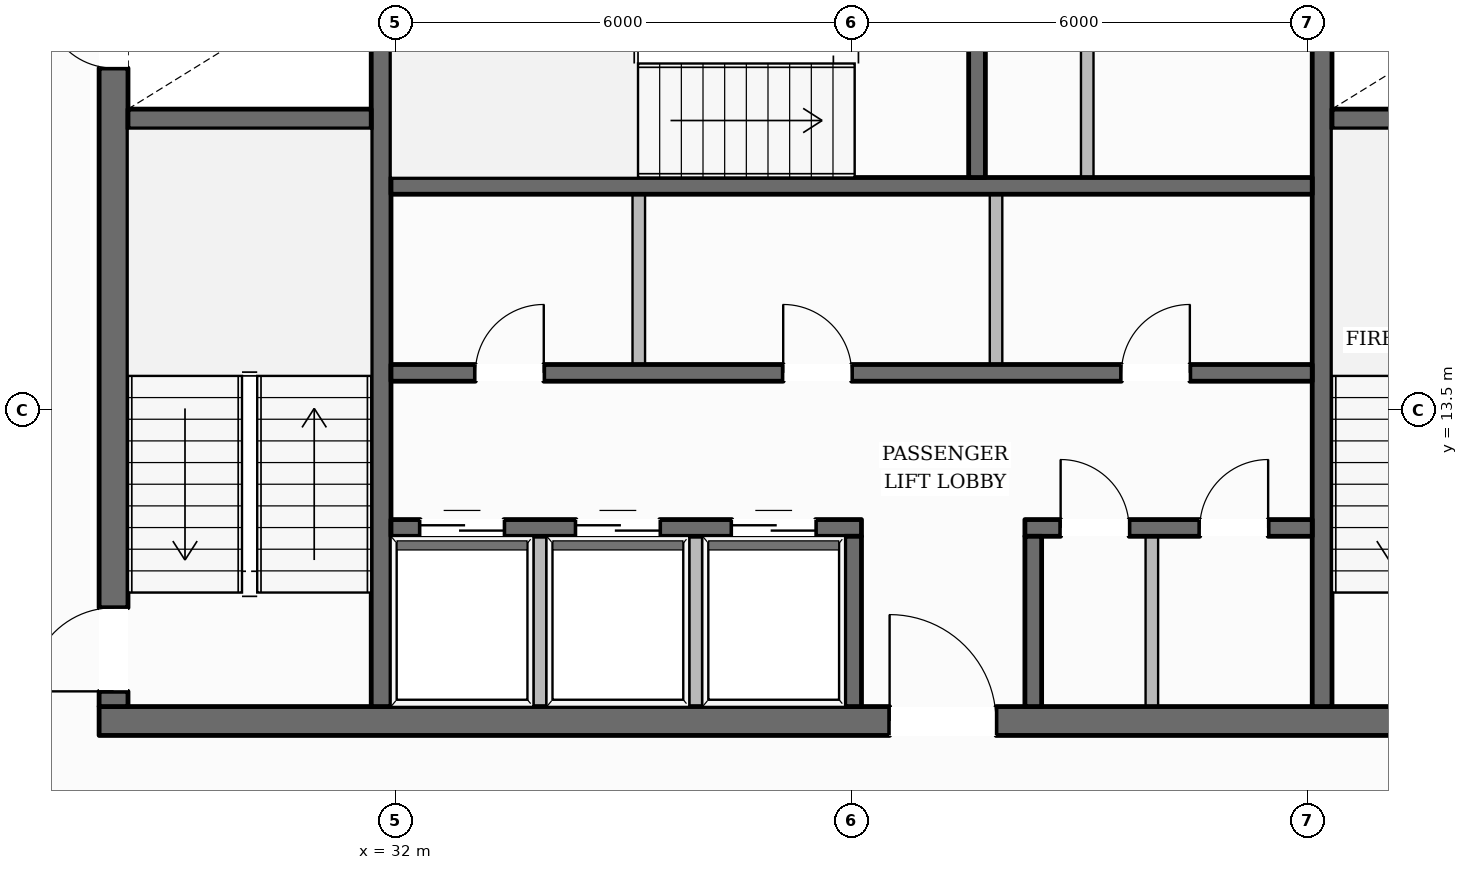
"""IFC4 building model, lengths in metres.
Left out: names, types, materials, properties, quantities, classifications, styles, units other than length and angle.
Written with IfcOpenShell. Run it as: python <this file> out.ifc"""

import sys

from ifc_helpers import new_model, si_unit, direction, frame, frame_2d, origin, place, context, subcontext, project, spatial, rectangle, extrude, element, fill, save


model = new_model("IFC4")
c1 = context("Model", 3, precision=1e-05, world=origin(), true_north=direction((0.0, 1.0)))
c2 = subcontext(c1, "Body", "Model", "MODEL_VIEW")
j1 = project(units=[si_unit("LENGTHUNIT", "METRE"), si_unit("PLANEANGLEUNIT", "RADIAN")], contexts=[c1])
p1 = place(None, origin())
s1 = spatial("IfcSite", under=j1, at=p1, CompositionType="ELEMENT")
p2 = place(p1, origin())
s2 = spatial("IfcBuilding", under=s1, at=p2, CompositionType="ELEMENT")
p3 = place(p2, frame((0.0, 0.0, 278.0)))
s3 = spatial("IfcBuildingStorey", under=s2, at=p3, CompositionType="ELEMENT", Elevation=278.0)
p4 = place(p3, frame((28.1, 9.41, 0.0), z_axis=(0.0, 0.0, 1.0), x_axis=(1.0, 0.0, 0.0)))
e1 = element("IfcWall", 1, at=p4, inside=s3, PredefinedType="SOLIDWALL", context=c2, shape_type="SweptSolid", body=[
    extrude(rectangle(XDim=19.8, YDim=0.38, at=frame_2d((9.9, 0.0))), origin(), (0.0, 0.0, 1.0), 3.61),
])
p5 = place(p4, frame((10.4, 0.0, 0.0)))
e2 = element("IfcOpeningElement", 2, at=p5, cuts=e1, PredefinedType="OPENING", context=c2, shape_type="SweptSolid", body=[
    extrude(rectangle(XDim=1.4, YDim=2.2, at=frame_2d((0.7, 1.1))), frame((0.0, 0.2, 0.0), z_axis=(0.0, -1.0, 0.0), x_axis=(1.0, 0.0, 0.0)), (0.0, 0.0, 1.0), 0.4),
])
p6 = place(p3, frame((28.29, 9.6, 0.0), z_axis=(0.0, 0.0, 1.0), x_axis=(0.0, 1.0, 0.0)))
e3 = element("IfcWall", 3, at=p6, inside=s3, PredefinedType="SOLIDWALL", context=c2, shape_type="SweptSolid", body=[
    extrude(rectangle(XDim=13.0, YDim=0.38, at=frame_2d((6.5, 0.0))), origin(), (0.0, 0.0, 1.0), 3.61),
])
p7 = place(p6, frame((0.2, 0.0, 0.0)))
e4 = element("IfcOpeningElement", 4, at=p7, cuts=e3, PredefinedType="OPENING", context=c2, shape_type="SweptSolid", body=[
    extrude(rectangle(XDim=1.1, YDim=2.15, at=frame_2d((0.55, 1.075))), frame((0.0, 0.2, 0.0), z_axis=(0.0, -1.0, 0.0), x_axis=(1.0, 0.0, 0.0)), (0.0, 0.0, 1.0), 0.4),
])
p8 = place(p6, frame((8.4, 0.0, 0.0)))
e5 = element("IfcOpeningElement", 5, at=p8, cuts=e3, PredefinedType="OPENING", context=c2, shape_type="SweptSolid", body=[
    extrude(rectangle(XDim=0.9, YDim=2.1, at=frame_2d((0.45, 1.05))), frame((0.0, 0.2, 0.0), z_axis=(0.0, -1.0, 0.0), x_axis=(1.0, 0.0, 0.0)), (0.0, 0.0, 1.0), 0.4),
])
p9 = place(p3, frame((31.81, 9.6, 0.0), z_axis=(0.0, 0.0, 1.0), x_axis=(0.0, 1.0, 0.0)))
e6 = element("IfcWall", 6, at=p9, inside=s3, PredefinedType="SHEAR", context=c2, shape_type="SweptSolid", body=[
    extrude(rectangle(XDim=13.0, YDim=0.26, at=frame_2d((6.5, 0.0))), origin(), (0.0, 0.0, 1.0), 3.61),
])
p10 = place(p9, frame((10.925, 0.0, 0.0)))
e7 = element("IfcOpeningElement", 7, at=p10, cuts=e6, PredefinedType="OPENING", context=c2, shape_type="SweptSolid", body=[
    extrude(rectangle(XDim=1.25, YDim=2.25, at=frame_2d((0.625, 1.125))), frame((0.0, 0.14, 0.0), z_axis=(0.0, -1.0, 0.0), x_axis=(1.0, 0.0, 0.0)), (0.0, 0.0, 1.0), 0.28),
])
p11 = place(p3, frame((44.19, 9.6, 0.0), z_axis=(0.0, 0.0, 1.0), x_axis=(0.0, 1.0, 0.0)))
e8 = element("IfcWall", 8, at=p11, inside=s3, PredefinedType="SHEAR", context=c2, shape_type="SweptSolid", body=[
    extrude(rectangle(XDim=13.0, YDim=0.26, at=frame_2d((6.5, 0.0))), origin(), (0.0, 0.0, 1.0), 3.61),
])
p12 = place(p11, frame((10.925, 0.0, 0.0)))
e9 = element("IfcOpeningElement", 9, at=p12, cuts=e8, PredefinedType="OPENING", context=c2, shape_type="SweptSolid", body=[
    extrude(rectangle(XDim=1.25, YDim=2.25, at=frame_2d((0.625, 1.125))), frame((0.0, 0.14, 0.0), z_axis=(0.0, -1.0, 0.0), x_axis=(1.0, 0.0, 0.0)), (0.0, 0.0, 1.0), 0.28),
])
for number, where, z_axis, x_axis in (
    (10, (28.48, 17.33, 0.0), (0.0, 0.0, 1.0), (1.0, 0.0, 0.0)),
    (11, (44.32, 17.33, 0.0), (0.0, 0.0, 1.0), (1.0, 0.0, 0.0)),
):
    element("IfcWall", number, at=place(p3, frame(where, z_axis=z_axis, x_axis=x_axis)), inside=s3, PredefinedType="SHEAR", context=c2, shape_type="SweptSolid", body=[
        extrude(rectangle(XDim=3.2, YDim=0.26, at=frame_2d((1.6, 0.0))), origin(), (0.0, 0.0, 1.0), 3.61),
    ])
p13 = place(p3, frame((31.94, 16.45, 0.0), z_axis=(0.0, 0.0, 1.0), x_axis=(1.0, 0.0, 0.0)))
e12 = element("IfcWall", 12, at=p13, inside=s3, PredefinedType="SOLIDWALL", context=c2, shape_type="SweptSolid", body=[
    extrude(rectangle(XDim=12.12, YDim=0.22, at=frame_2d((6.06, 0.0))), origin(), (0.0, 0.0, 1.0), 3.61),
])
p14 = place(p3, frame((39.65, 16.56, 0.0), z_axis=(0.0, 0.0, 1.0), x_axis=(0.0, 1.0, 0.0)))
e13 = element("IfcWall", 13, at=p14, inside=s3, PredefinedType="SOLIDWALL", context=c2, shape_type="SweptSolid", body=[
    extrude(rectangle(XDim=3.2, YDim=0.22, at=frame_2d((1.6, 0.0))), origin(), (0.0, 0.0, 1.0), 3.61),
])
p15 = place(p3, frame((31.94, 13.99, 0.0), z_axis=(0.0, 0.0, 1.0), x_axis=(1.0, 0.0, 0.0)))
e14 = element("IfcWall", 14, at=p15, inside=s3, PredefinedType="SOLIDWALL", context=c2, shape_type="SweptSolid", body=[
    extrude(rectangle(XDim=12.12, YDim=0.22, at=frame_2d((6.06, 0.0))), origin(), (0.0, 0.0, 1.0), 3.61),
])
p16 = place(p15, frame((1.11, 0.0, 0.0)))
e15 = element("IfcOpeningElement", 15, at=p16, cuts=e14, PredefinedType="OPENING", context=c2, shape_type="SweptSolid", body=[
    extrude(rectangle(XDim=0.9, YDim=2.1, at=frame_2d((0.45, 1.05))), frame((0.0, 0.12, 0.0), z_axis=(0.0, -1.0, 0.0), x_axis=(1.0, 0.0, 0.0)), (0.0, 0.0, 1.0), 0.24),
])
p17 = place(p15, frame((5.16, 0.0, 0.0)))
e16 = element("IfcOpeningElement", 16, at=p17, cuts=e14, PredefinedType="OPENING", context=c2, shape_type="SweptSolid", body=[
    extrude(rectangle(XDim=0.9, YDim=2.1, at=frame_2d((0.45, 1.05))), frame((0.0, 0.12, 0.0), z_axis=(0.0, -1.0, 0.0), x_axis=(1.0, 0.0, 0.0)), (0.0, 0.0, 1.0), 0.24),
])
p18 = place(p15, frame((9.61, 0.0, 0.0)))
e17 = element("IfcOpeningElement", 17, at=p18, cuts=e14, PredefinedType="OPENING", context=c2, shape_type="SweptSolid", body=[
    extrude(rectangle(XDim=0.9, YDim=2.1, at=frame_2d((0.45, 1.05))), frame((0.0, 0.12, 0.0), z_axis=(0.0, -1.0, 0.0), x_axis=(1.0, 0.0, 0.0)), (0.0, 0.0, 1.0), 0.24),
])
p19 = place(p3, frame((31.94, 11.95, 0.0), z_axis=(0.0, 0.0, 1.0), x_axis=(1.0, 0.0, 0.0)))
e18 = element("IfcWall", 18, at=p19, inside=s3, PredefinedType="SOLIDWALL", context=c2, shape_type="SweptSolid", body=[
    extrude(rectangle(XDim=6.19, YDim=0.22, at=frame_2d((3.095, 0.0))), origin(), (0.0, 0.0, 1.0), 3.61),
])
p20 = place(p19, frame((0.385, 0.0, 0.0)))
e19 = element("IfcOpeningElement", 19, at=p20, cuts=e18, PredefinedType="OPENING", context=c2, shape_type="SweptSolid", body=[
    extrude(rectangle(XDim=1.1, YDim=2.2, at=frame_2d((0.55, 1.1))), frame((0.0, 0.12, 0.0), z_axis=(0.0, -1.0, 0.0), x_axis=(1.0, 0.0, 0.0)), (0.0, 0.0, 1.0), 0.24),
])
p21 = place(p19, frame((2.435, 0.0, 0.0)))
e20 = element("IfcOpeningElement", 20, at=p21, cuts=e18, PredefinedType="OPENING", context=c2, shape_type="SweptSolid", body=[
    extrude(rectangle(XDim=1.1, YDim=2.2, at=frame_2d((0.55, 1.1))), frame((0.0, 0.12, 0.0), z_axis=(0.0, -1.0, 0.0), x_axis=(1.0, 0.0, 0.0)), (0.0, 0.0, 1.0), 0.24),
])
p22 = place(p19, frame((4.485, 0.0, 0.0)))
e21 = element("IfcOpeningElement", 21, at=p22, cuts=e18, PredefinedType="OPENING", context=c2, shape_type="SweptSolid", body=[
    extrude(rectangle(XDim=1.1, YDim=2.2, at=frame_2d((0.55, 1.1))), frame((0.0, 0.12, 0.0), z_axis=(0.0, -1.0, 0.0), x_axis=(1.0, 0.0, 0.0)), (0.0, 0.0, 1.0), 0.24),
])
p23 = place(p3, frame((40.28, 11.95, 0.0), z_axis=(0.0, 0.0, 1.0), x_axis=(1.0, 0.0, 0.0)))
e22 = element("IfcWall", 22, at=p23, inside=s3, PredefinedType="SOLIDWALL", context=c2, shape_type="SweptSolid", body=[
    extrude(rectangle(XDim=3.78, YDim=0.22, at=frame_2d((1.89, 0.0))), origin(), (0.0, 0.0, 1.0), 3.61),
])
p24 = place(p23, frame((0.47, 0.0, 0.0)))
e23 = element("IfcOpeningElement", 23, at=p24, cuts=e22, PredefinedType="OPENING", context=c2, shape_type="SweptSolid", body=[
    extrude(rectangle(XDim=0.9, YDim=2.1, at=frame_2d((0.45, 1.05))), frame((0.0, 0.12, 0.0), z_axis=(0.0, -1.0, 0.0), x_axis=(1.0, 0.0, 0.0)), (0.0, 0.0, 1.0), 0.24),
])
p25 = place(p23, frame((2.3, 0.0, 0.0)))
e24 = element("IfcOpeningElement", 24, at=p25, cuts=e22, PredefinedType="OPENING", context=c2, shape_type="SweptSolid", body=[
    extrude(rectangle(XDim=0.9, YDim=2.1, at=frame_2d((0.45, 1.05))), frame((0.0, 0.12, 0.0), z_axis=(0.0, -1.0, 0.0), x_axis=(1.0, 0.0, 0.0)), (0.0, 0.0, 1.0), 0.24),
])
for number, where, z_axis, x_axis in (
    (25, (38.02, 9.6, 0.0), (0.0, 0.0, 1.0), (0.0, 1.0, 0.0)),
    (26, (40.39, 9.6, 0.0), (0.0, 0.0, 1.0), (0.0, 1.0, 0.0)),
):
    element("IfcWall", number, at=place(p3, frame(where, z_axis=z_axis, x_axis=x_axis)), inside=s3, PredefinedType="SOLIDWALL", context=c2, shape_type="SweptSolid", body=[
        extrude(rectangle(XDim=2.24, YDim=0.22, at=frame_2d((1.12, 0.0))), origin(), (0.0, 0.0, 1.0), 3.61),
    ])
p26 = place(p3, frame((15.322, 10.186, 0.0), z_axis=(0.0, 0.0, 1.0), x_axis=(0.510014133956, 0.860166020699, 0.0)))
e27 = element("IfcWall", 27, at=p26, inside=s3, PredefinedType="STANDARD", context=c2, shape_type="SweptSolid", body=[
    extrude(rectangle(XDim=38.65, YDim=0.35, at=frame_2d((19.325, 0.0))), origin(), (0.0, 0.0, 1.0), 3.196),
])
p27 = place(p26, frame((34.362, 0.0, 0.65)))
e28 = element("IfcOpeningElement", 28, at=p27, cuts=e27, PredefinedType="OPENING", context=c2, shape_type="SweptSolid", body=[
    extrude(rectangle(XDim=1.35, YDim=1.75, at=frame_2d((0.675, 0.875))), frame((0.0, 0.185, 0.0), z_axis=(0.0, -1.0, 0.0), x_axis=(1.0, 0.0, 0.0)), (0.0, 0.0, 1.0), 0.37),
])
p28 = place(p26, frame((28.08, 0.0, 0.65)))
e29 = element("IfcOpeningElement", 29, at=p28, cuts=e27, PredefinedType="OPENING", context=c2, shape_type="SweptSolid", body=[
    extrude(rectangle(XDim=1.35, YDim=1.75, at=frame_2d((0.675, 0.875))), frame((0.0, 0.185, 0.0), z_axis=(0.0, -1.0, 0.0), x_axis=(1.0, 0.0, 0.0)), (0.0, 0.0, 1.0), 0.37),
])
p29 = place(p26, frame((21.797, 0.0, 0.65)))
e30 = element("IfcOpeningElement", 30, at=p29, cuts=e27, PredefinedType="OPENING", context=c2, shape_type="SweptSolid", body=[
    extrude(rectangle(XDim=1.35, YDim=1.75, at=frame_2d((0.675, 0.875))), frame((0.0, 0.185, 0.0), z_axis=(0.0, -1.0, 0.0), x_axis=(1.0, 0.0, 0.0)), (0.0, 0.0, 1.0), 0.37),
])
p30 = place(p26, frame((9.232, 0.0, 0.65)))
e31 = element("IfcOpeningElement", 31, at=p30, cuts=e27, PredefinedType="OPENING", context=c2, shape_type="SweptSolid", body=[
    extrude(rectangle(XDim=1.35, YDim=1.75, at=frame_2d((0.675, 0.875))), frame((0.0, 0.185, 0.0), z_axis=(0.0, -1.0, 0.0), x_axis=(1.0, 0.0, 0.0)), (0.0, 0.0, 1.0), 0.37),
])
p31 = place(p26, frame((2.949, 0.0, 0.65)))
e32 = element("IfcOpeningElement", 32, at=p31, cuts=e27, PredefinedType="OPENING", context=c2, shape_type="SweptSolid", body=[
    extrude(rectangle(XDim=1.35, YDim=1.75, at=frame_2d((0.675, 0.875))), frame((0.0, 0.185, 0.0), z_axis=(0.0, -1.0, 0.0), x_axis=(1.0, 0.0, 0.0)), (0.0, 0.0, 1.0), 0.37),
])
p32 = place(p3, frame((40.917, 43.461, 0.0), z_axis=(0.0, 0.0, 1.0), x_axis=(0.506204788728, -0.862413306872, 0.0)))
e33 = element("IfcWall", 33, at=p32, inside=s3, PredefinedType="STANDARD", context=c2, shape_type="SweptSolid", body=[
    extrude(rectangle(XDim=38.352, YDim=0.35, at=frame_2d((19.176, 0.0))), origin(), (0.0, 0.0, 1.0), 3.196),
])
p33 = place(p32, frame((9.188, 0.0, 0.0)))
e34 = element("IfcOpeningElement", 34, at=p33, cuts=e33, PredefinedType="OPENING", context=c2, shape_type="SweptSolid", body=[
    extrude(rectangle(XDim=1.0, YDim=2.2, at=frame_2d((0.5, 1.1))), frame((0.0, 0.185, 0.0), z_axis=(0.0, -1.0, 0.0), x_axis=(1.0, 0.0, 0.0)), (0.0, 0.0, 1.0), 0.37),
])
p34 = place(p32, frame((34.078, 0.0, 0.65)))
e35 = element("IfcOpeningElement", 35, at=p34, cuts=e33, PredefinedType="OPENING", context=c2, shape_type="SweptSolid", body=[
    extrude(rectangle(XDim=1.35, YDim=1.75, at=frame_2d((0.675, 0.875))), frame((0.0, 0.185, 0.0), z_axis=(0.0, -1.0, 0.0), x_axis=(1.0, 0.0, 0.0)), (0.0, 0.0, 1.0), 0.37),
])
p35 = place(p32, frame((27.846, 0.0, 0.65)))
e36 = element("IfcOpeningElement", 36, at=p35, cuts=e33, PredefinedType="OPENING", context=c2, shape_type="SweptSolid", body=[
    extrude(rectangle(XDim=1.35, YDim=1.75, at=frame_2d((0.675, 0.875))), frame((0.0, 0.185, 0.0), z_axis=(0.0, -1.0, 0.0), x_axis=(1.0, 0.0, 0.0)), (0.0, 0.0, 1.0), 0.37),
])
p36 = place(p32, frame((21.614, 0.0, 0.65)))
e37 = element("IfcOpeningElement", 37, at=p36, cuts=e33, PredefinedType="OPENING", context=c2, shape_type="SweptSolid", body=[
    extrude(rectangle(XDim=1.35, YDim=1.75, at=frame_2d((0.675, 0.875))), frame((0.0, 0.185, 0.0), z_axis=(0.0, -1.0, 0.0), x_axis=(1.0, 0.0, 0.0)), (0.0, 0.0, 1.0), 0.37),
])
p37 = place(p32, frame((2.917, 0.0, 0.65)))
e38 = element("IfcOpeningElement", 38, at=p37, cuts=e33, PredefinedType="OPENING", context=c2, shape_type="SweptSolid", body=[
    extrude(rectangle(XDim=1.35, YDim=1.75, at=frame_2d((0.675, 0.875))), frame((0.0, 0.185, 0.0), z_axis=(0.0, -1.0, 0.0), x_axis=(1.0, 0.0, 0.0)), (0.0, 0.0, 1.0), 0.37),
])
for number, where, z_axis, x_axis in (
    (39, (33.9, 9.49, 0.0), (0.0, 0.0, 1.0), (0.0, 1.0, 0.0)),
    (40, (35.95, 9.49, 0.0), (0.0, 0.0, 1.0), (0.0, 1.0, 0.0)),
):
    element("IfcWall", number, at=place(p3, frame(where, z_axis=z_axis, x_axis=x_axis)), inside=s3, PredefinedType="PARTITIONING", context=c2, shape_type="SweptSolid", body=[
        extrude(rectangle(XDim=2.35, YDim=0.165, at=frame_2d((1.175, 0.0))), origin(), (0.0, 0.0, 1.0), 3.61),
    ])
for number, where, z_axis, x_axis in (
    (41, (35.2, 14.1, 0.0), (0.0, 0.0, 1.0), (0.0, 1.0, 0.0)),
    (42, (39.9, 14.1, 0.0), (0.0, 0.0, 1.0), (0.0, 1.0, 0.0)),
):
    element("IfcWall", number, at=place(p3, frame(where, z_axis=z_axis, x_axis=x_axis)), inside=s3, PredefinedType="PARTITIONING", context=c2, shape_type="SweptSolid", body=[
        extrude(rectangle(XDim=2.24, YDim=0.165, at=frame_2d((1.12, 0.0))), origin(), (0.0, 0.0, 1.0), 3.61),
    ])
p38 = place(p3, frame((41.1, 16.56, 0.0), z_axis=(0.0, 0.0, 1.0), x_axis=(0.0, 1.0, 0.0)))
e43 = element("IfcWall", 43, at=p38, inside=s3, PredefinedType="PARTITIONING", context=c2, shape_type="SweptSolid", body=[
    extrude(rectangle(XDim=3.2, YDim=0.165, at=frame_2d((1.6, 0.0))), origin(), (0.0, 0.0, 1.0), 3.61),
])
p39 = place(p3, frame((41.95, 9.49, 0.0), z_axis=(0.0, 0.0, 1.0), x_axis=(0.0, 1.0, 0.0)))
e44 = element("IfcWall", 44, at=p39, inside=s3, PredefinedType="PARTITIONING", context=c2, shape_type="SweptSolid", body=[
    extrude(rectangle(XDim=2.35, YDim=0.165, at=frame_2d((1.175, 0.0))), origin(), (0.0, 0.0, 1.0), 3.61),
])
p40 = place(p7, origin())
e45 = element("IfcDoor", 45, at=p40, inside=s3, OperationType="SINGLE_SWING_LEFT", PredefinedType="DOOR", context=c2, shape_type="SweptSolid", body=[
    extrude(rectangle(XDim=1.1, YDim=2.15, at=frame_2d((0.55, 1.075))), frame((0.0, 0.025, 0.0), z_axis=(0.0, -1.0, 0.0), x_axis=(1.0, 0.0, 0.0)), (0.0, 0.0, 1.0), 0.05),
])
fill(e4, e45)
p41 = place(p8, origin())
e46 = element("IfcDoor", 46, at=p41, inside=s3, OperationType="SINGLE_SWING_RIGHT", PredefinedType="DOOR", context=c2, shape_type="SweptSolid", body=[
    extrude(rectangle(XDim=0.9, YDim=2.1, at=frame_2d((0.45, 1.05))), frame((0.0, 0.025, 0.0), z_axis=(0.0, -1.0, 0.0), x_axis=(1.0, 0.0, 0.0)), (0.0, 0.0, 1.0), 0.05),
])
fill(e5, e46)
p42 = place(p5, origin())
e47 = element("IfcDoor", 47, at=p42, inside=s3, OperationType="SINGLE_SWING_LEFT", PredefinedType="DOOR", context=c2, shape_type="SweptSolid", body=[
    extrude(rectangle(XDim=1.4, YDim=2.2, at=frame_2d((0.7, 1.1))), frame((0.0, 0.025, 0.0), z_axis=(0.0, -1.0, 0.0), x_axis=(1.0, 0.0, 0.0)), (0.0, 0.0, 1.0), 0.05),
])
fill(e2, e47)
p43 = place(p20, origin())
e48 = element("IfcDoor", 48, at=p43, inside=s3, OperationType="DOUBLE_DOOR_SLIDING", PredefinedType="DOOR", context=c2, shape_type="SweptSolid", body=[
    extrude(rectangle(XDim=1.1, YDim=2.2, at=frame_2d((0.55, 1.1))), frame((0.0, 0.025, 0.0), z_axis=(0.0, -1.0, 0.0), x_axis=(1.0, 0.0, 0.0)), (0.0, 0.0, 1.0), 0.05),
])
fill(e19, e48)
p44 = place(p21, origin())
e49 = element("IfcDoor", 49, at=p44, inside=s3, OperationType="DOUBLE_DOOR_SLIDING", PredefinedType="DOOR", context=c2, shape_type="SweptSolid", body=[
    extrude(rectangle(XDim=1.1, YDim=2.2, at=frame_2d((0.55, 1.1))), frame((0.0, 0.025, 0.0), z_axis=(0.0, -1.0, 0.0), x_axis=(1.0, 0.0, 0.0)), (0.0, 0.0, 1.0), 0.05),
])
fill(e20, e49)
p45 = place(p22, origin())
e50 = element("IfcDoor", 50, at=p45, inside=s3, OperationType="DOUBLE_DOOR_SLIDING", PredefinedType="DOOR", context=c2, shape_type="SweptSolid", body=[
    extrude(rectangle(XDim=1.1, YDim=2.2, at=frame_2d((0.55, 1.1))), frame((0.0, 0.025, 0.0), z_axis=(0.0, -1.0, 0.0), x_axis=(1.0, 0.0, 0.0)), (0.0, 0.0, 1.0), 0.05),
])
fill(e21, e50)
p46 = place(p16, origin())
e51 = element("IfcDoor", 51, at=p46, inside=s3, OperationType="SINGLE_SWING_RIGHT", PredefinedType="DOOR", context=c2, shape_type="SweptSolid", body=[
    extrude(rectangle(XDim=0.9, YDim=2.1, at=frame_2d((0.45, 1.05))), frame((0.0, 0.025, 0.0), z_axis=(0.0, -1.0, 0.0), x_axis=(1.0, 0.0, 0.0)), (0.0, 0.0, 1.0), 0.05),
])
fill(e15, e51)
p47 = place(p17, origin())
e52 = element("IfcDoor", 52, at=p47, inside=s3, OperationType="SINGLE_SWING_LEFT", PredefinedType="DOOR", context=c2, shape_type="SweptSolid", body=[
    extrude(rectangle(XDim=0.9, YDim=2.1, at=frame_2d((0.45, 1.05))), frame((0.0, 0.025, 0.0), z_axis=(0.0, -1.0, 0.0), x_axis=(1.0, 0.0, 0.0)), (0.0, 0.0, 1.0), 0.05),
])
fill(e16, e52)
p48 = place(p18, origin())
e53 = element("IfcDoor", 53, at=p48, inside=s3, OperationType="SINGLE_SWING_RIGHT", PredefinedType="DOOR", context=c2, shape_type="SweptSolid", body=[
    extrude(rectangle(XDim=0.9, YDim=2.1, at=frame_2d((0.45, 1.05))), frame((0.0, 0.025, 0.0), z_axis=(0.0, -1.0, 0.0), x_axis=(1.0, 0.0, 0.0)), (0.0, 0.0, 1.0), 0.05),
])
fill(e17, e53)
p49 = place(p24, origin())
e54 = element("IfcDoor", 54, at=p49, inside=s3, OperationType="SINGLE_SWING_LEFT", PredefinedType="DOOR", context=c2, shape_type="SweptSolid", body=[
    extrude(rectangle(XDim=0.9, YDim=2.1, at=frame_2d((0.45, 1.05))), frame((0.0, 0.025, 0.0), z_axis=(0.0, -1.0, 0.0), x_axis=(1.0, 0.0, 0.0)), (0.0, 0.0, 1.0), 0.05),
])
fill(e23, e54)
p50 = place(p25, origin())
e55 = element("IfcDoor", 55, at=p50, inside=s3, OperationType="SINGLE_SWING_RIGHT", PredefinedType="DOOR", context=c2, shape_type="SweptSolid", body=[
    extrude(rectangle(XDim=0.9, YDim=2.1, at=frame_2d((0.45, 1.05))), frame((0.0, 0.025, 0.0), z_axis=(0.0, -1.0, 0.0), x_axis=(1.0, 0.0, 0.0)), (0.0, 0.0, 1.0), 0.05),
])
fill(e24, e55)
save(model, sys.argv[1])
